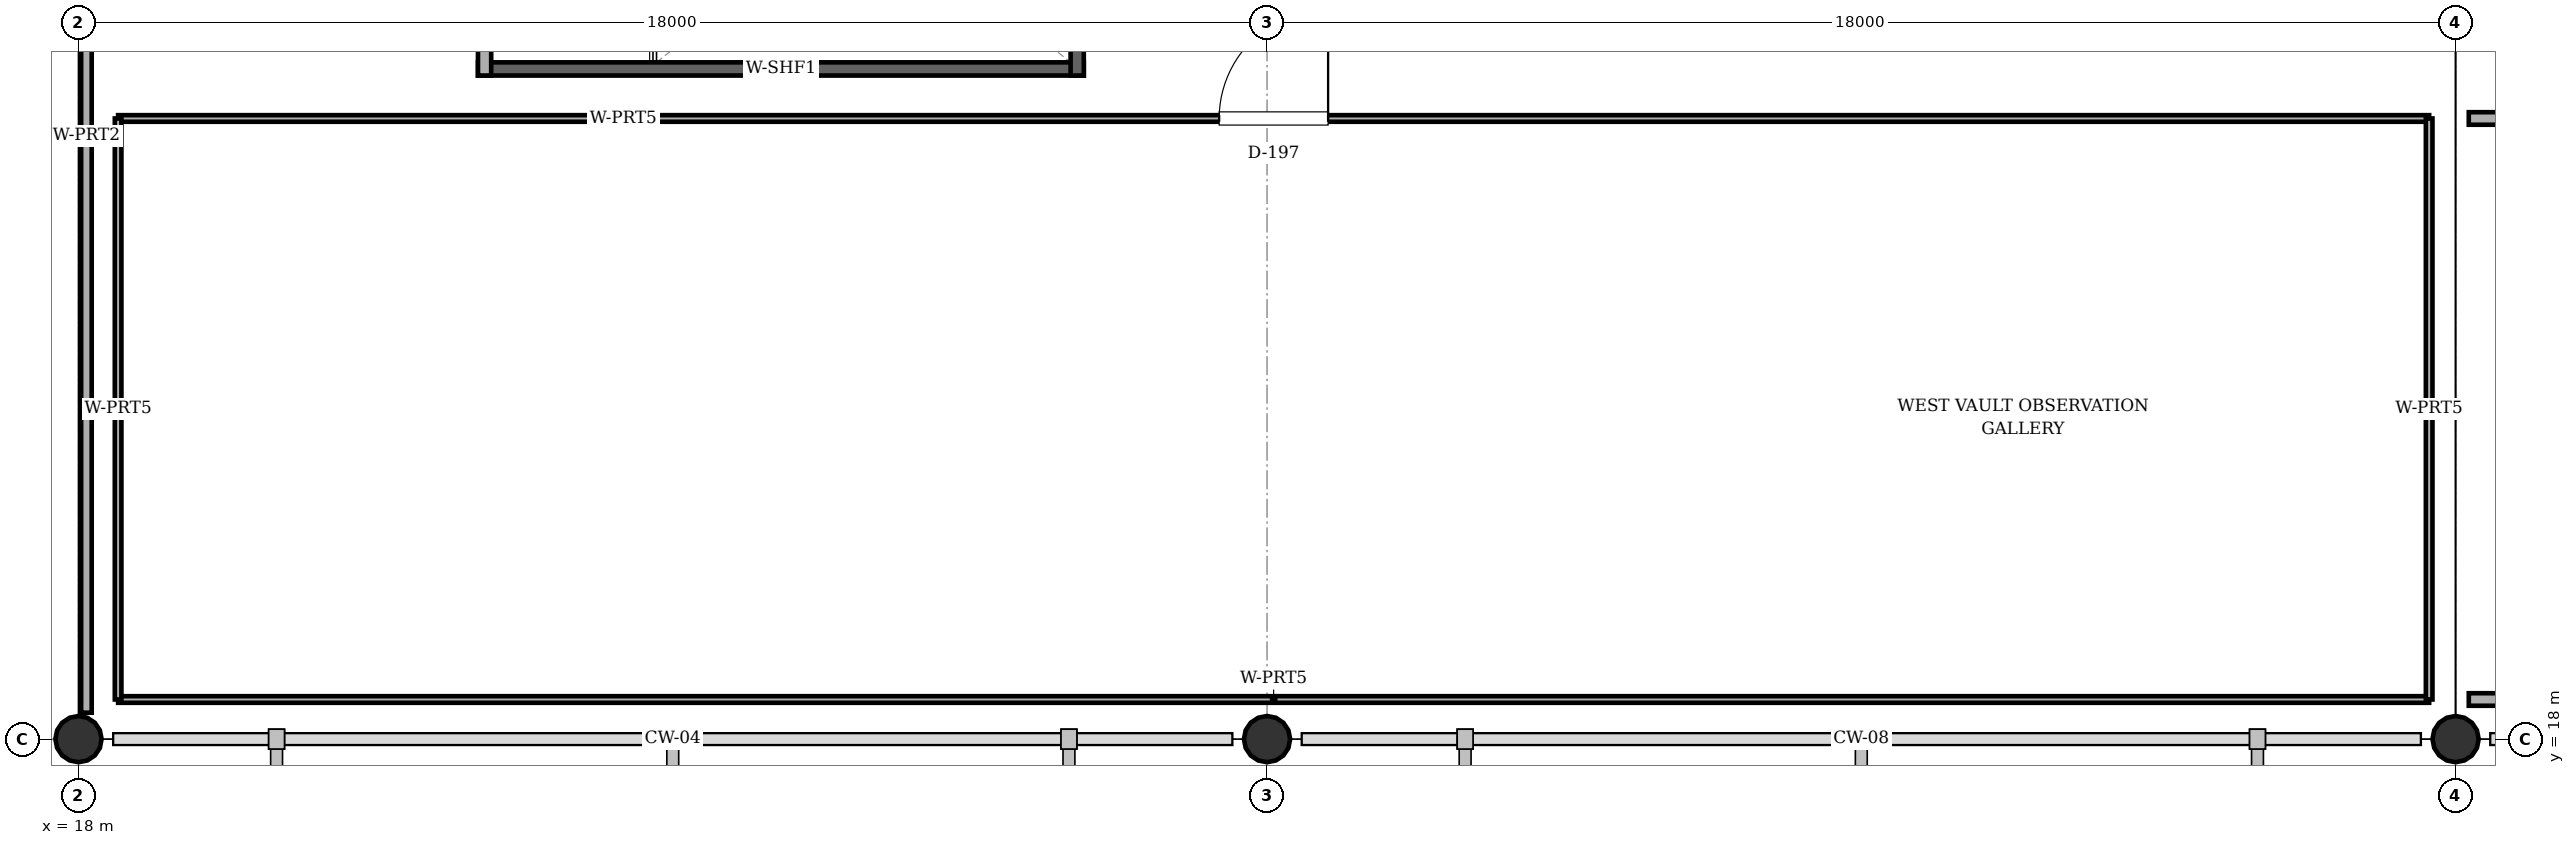
"""IFC4 building model, lengths in metres.
Left out: names, types, materials, properties, quantities, classifications, styles, units other than length and angle.
Written with IfcOpenShell. Run it as: python <this file> out.ifc"""

import sys

from ifc_helpers import new_model, si_unit, direction, frame, frame_2d, origin, origin_2d, place, context, subcontext, project, spatial, rectangle, circle, extrude, element, fill, save


model = new_model("IFC4")
c1 = context("Model", 3, precision=1e-05, world=origin(), true_north=direction((0.0, 1.0)))
c2 = subcontext(c1, "Body", "Model", "MODEL_VIEW")
j1 = project(units=[si_unit("LENGTHUNIT", "METRE"), si_unit("PLANEANGLEUNIT", "RADIAN")], contexts=[c1])
p1 = place(None, origin())
s1 = spatial("IfcSite", under=j1, at=p1, CompositionType="ELEMENT")
p2 = place(p1, origin())
s2 = spatial("IfcBuilding", under=s1, at=p2, CompositionType="ELEMENT")
p3 = place(p2, frame((0.0, 0.0, 10.8)))
s3 = spatial("IfcBuildingStorey", under=s2, at=p3, CompositionType="ELEMENT", Elevation=10.8)
for number, where, z_axis, x_axis in (
    (1, (18.0, 18.0, 0.0), (0.0, 0.0, 1.0), (1.0, 0.0, 0.0)),
    (2, (36.0, 18.0, 0.0), (0.0, 0.0, 1.0), (1.0, 0.0, 0.0)),
    (3, (54.0, 18.0, 0.0), (0.0, 0.0, 1.0), (1.0, 0.0, 0.0)),
):
    element("IfcColumn", number, at=place(p3, frame(where, z_axis=z_axis, x_axis=x_axis)), inside=s3, PredefinedType="COLUMN", context=c2, shape_type="SweptSolid", body=[
        extrude(circle(Radius=0.35, at=origin_2d()), origin(), (0.0, 0.0, 1.0), 3.35),
    ])
p4 = place(p3, frame((18.12, 18.4, 0.0), z_axis=(0.0, 0.0, 1.0), x_axis=(0.0, 1.0, 0.0)))
e4 = element("IfcWall", 4, at=p4, inside=s3, PredefinedType="PARTITIONING", context=c2, shape_type="SweptSolid", body=[
    extrude(rectangle(XDim=17.48, YDim=0.16, at=frame_2d((8.74, 0.0))), origin(), (0.0, 0.0, 1.0), 2.15),
])
p5 = place(p3, frame((24.05, 28.15, 0.0), z_axis=(0.0, 0.0, 1.0), x_axis=(1.0, 0.0, 0.0)))
e5 = element("IfcWall", 5, at=p5, inside=s3, PredefinedType="SOLIDWALL", context=c2, shape_type="SweptSolid", body=[
    extrude(rectangle(XDim=9.175, YDim=0.2, at=frame_2d((4.587, 0.0))), origin(), (0.0, 0.0, 1.0), 2.45),
])
p6 = place(p3, frame((33.125, 28.05, 0.0), z_axis=(0.0, 0.0, 1.0), x_axis=(0.0, 1.0, 0.0)))
e6 = element("IfcWall", 6, at=p6, inside=s3, PredefinedType="SOLIDWALL", context=c2, shape_type="SweptSolid", body=[
    extrude(rectangle(XDim=5.4, YDim=0.2, at=frame_2d((2.7, 0.0))), origin(), (0.0, 0.0, 1.0), 2.45),
])
p7 = place(p3, frame((24.15, 33.45, 0.0), z_axis=(0.0, 0.0, 1.0), x_axis=(0.0, -1.0, 0.0)))
e7 = element("IfcWall", 7, at=p7, inside=s3, PredefinedType="SOLIDWALL", context=c2, shape_type="SweptSolid", body=[
    extrude(rectangle(XDim=5.4, YDim=0.2, at=frame_2d((2.7, 0.0))), origin(), (0.0, 0.0, 1.0), 2.45),
])
p8 = place(p7, frame((1.9, 0.0, 0.0)))
e8 = element("IfcOpeningElement", 8, at=p8, cuts=e7, PredefinedType="OPENING", context=c2, shape_type="SweptSolid", body=[
    extrude(rectangle(XDim=1.6, YDim=2.15, at=frame_2d((0.8, 1.075))), frame((0.0, 0.11, 0.0), z_axis=(0.0, -1.0, 0.0), x_axis=(1.0, 0.0, 0.0)), (0.0, 0.0, 1.0), 0.22),
])
p9 = place(p3, frame((53.6, 18.6, 0.0), z_axis=(0.0, 0.0, 1.0), x_axis=(-1.0, 0.0, 0.0)))
e9 = element("IfcWall", 9, at=p9, inside=s3, PredefinedType="PARTITIONING", context=c2, shape_type="SweptSolid", body=[
    extrude(rectangle(XDim=35.0, YDim=0.1, at=frame_2d((17.5, 0.0))), origin(), (0.0, 0.0, 1.0), 3.275),
])
p10 = place(p3, frame((18.6, 27.4, 0.0), z_axis=(0.0, 0.0, 1.0), x_axis=(1.0, 0.0, 0.0)))
e10 = element("IfcWall", 10, at=p10, inside=s3, PredefinedType="PARTITIONING", context=c2, shape_type="SweptSolid", body=[
    extrude(rectangle(XDim=35.0, YDim=0.1, at=frame_2d((17.5, 0.0))), origin(), (0.0, 0.0, 1.0), 3.275),
])
p11 = place(p10, frame((16.675, 0.0, 0.0)))
e11 = element("IfcOpeningElement", 11, at=p11, cuts=e10, PredefinedType="OPENING", context=c2, shape_type="SweptSolid", body=[
    extrude(rectangle(XDim=1.65, YDim=2.1, at=frame_2d((0.825, 1.05))), frame((0.0, 0.06, 0.0), z_axis=(0.0, -1.0, 0.0), x_axis=(1.0, 0.0, 0.0)), (0.0, 0.0, 1.0), 0.12),
])
for number, where, z_axis, x_axis in (
    (12, (18.6, 18.6, 0.0), (0.0, 0.0, 1.0), (0.0, 1.0, 0.0)),
    (13, (53.6, 27.4, 0.0), (0.0, 0.0, 1.0), (0.0, -1.0, 0.0)),
):
    element("IfcWall", number, at=place(p3, frame(where, z_axis=z_axis, x_axis=x_axis)), inside=s3, PredefinedType="PARTITIONING", context=c2, shape_type="SweptSolid", body=[
        extrude(rectangle(XDim=8.8, YDim=0.1, at=frame_2d((4.4, 0.0))), origin(), (0.0, 0.0, 1.0), 3.275),
    ])
p12 = place(p3, frame((75.6, 18.6, 0.0), z_axis=(0.0, 0.0, 1.0), x_axis=(-1.0, 0.0, 0.0)))
e14 = element("IfcWall", 14, at=p12, inside=s3, PredefinedType="PARTITIONING", context=c2, shape_type="SweptSolid", body=[
    extrude(rectangle(XDim=21.4, YDim=0.19, at=frame_2d((10.7, 0.0))), origin(), (0.0, 0.0, 1.0), 3.275),
])
p13 = place(p3, frame((54.2, 27.4, 0.0), z_axis=(0.0, 0.0, 1.0), x_axis=(1.0, 0.0, 0.0)))
e15 = element("IfcWall", 15, at=p13, inside=s3, PredefinedType="PARTITIONING", context=c2, shape_type="SweptSolid", body=[
    extrude(rectangle(XDim=21.4, YDim=0.19, at=frame_2d((10.7, 0.0))), origin(), (0.0, 0.0, 1.0), 3.275),
])
p14 = place(p13, frame((9.875, 0.0, 0.0)))
e16 = element("IfcOpeningElement", 16, at=p14, cuts=e15, PredefinedType="OPENING", context=c2, shape_type="SweptSolid", body=[
    extrude(rectangle(XDim=1.65, YDim=2.1, at=frame_2d((0.825, 1.05))), frame((0.0, 0.105, 0.0), z_axis=(0.0, -1.0, 0.0), x_axis=(1.0, 0.0, 0.0)), (0.0, 0.0, 1.0), 0.21),
])
p15 = place(p11, origin())
e17 = element("IfcDoor", 17, at=p15, inside=s3, OperationType="SINGLE_SWING_RIGHT", PredefinedType="DOOR", context=c2, shape_type="SweptSolid", body=[
    extrude(rectangle(XDim=1.65, YDim=2.1, at=frame_2d((0.825, 1.05))), frame((0.0, 0.025, 0.0), z_axis=(0.0, -1.0, 0.0), x_axis=(1.0, 0.0, 0.0)), (0.0, 0.0, 1.0), 0.05),
])
fill(e11, e17)
save(model, sys.argv[1])
